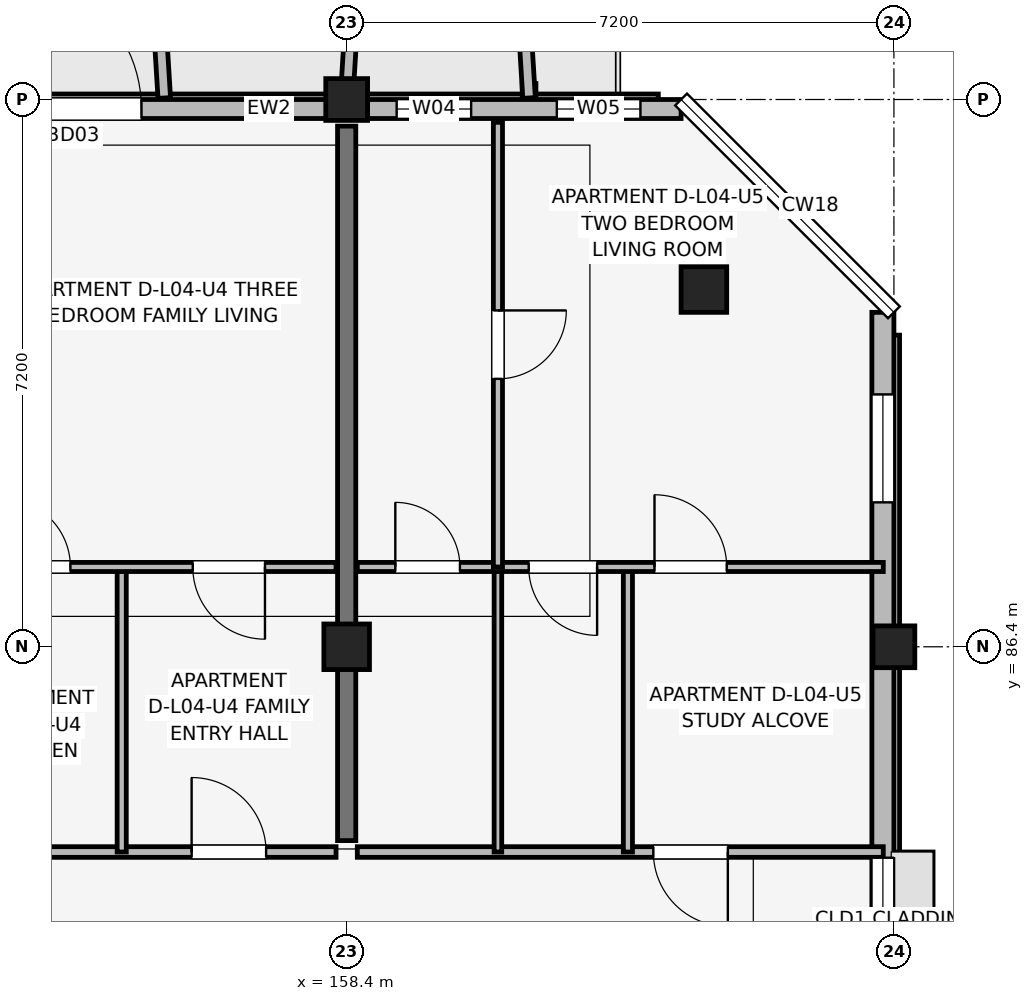
"""IFC4 building model, lengths in metres.
Left out: names, types, materials, properties, quantities, classifications, styles, units other than length and angle.
Written with IfcOpenShell. Run it as: python <this file> out.ifc"""

import sys

from ifc_helpers import new_model, si_unit, direction, frame, frame_2d, origin, origin_2d, place, context, subcontext, project, spatial, rectangle, extrude, element, fill, save


model = new_model("IFC4")
c1 = context("Model", 3, precision=1e-05, world=origin(), true_north=direction((0.0, 1.0)))
c2 = subcontext(c1, "Body", "Model", "MODEL_VIEW")
j1 = project(units=[si_unit("LENGTHUNIT", "METRE"), si_unit("PLANEANGLEUNIT", "RADIAN")], contexts=[c1])
p1 = place(None, origin())
s1 = spatial("IfcSite", under=j1, at=p1, CompositionType="ELEMENT")
p2 = place(p1, origin())
s2 = spatial("IfcBuilding", under=s1, at=p2, CompositionType="ELEMENT")
p3 = place(p2, frame((0.0, 0.0, 15.0)))
s3 = spatial("IfcBuildingStorey", under=s2, at=p3, CompositionType="ELEMENT", Elevation=15.0)
p4 = place(p3, frame((158.4, 86.4, 0.0), z_axis=(0.0, 0.0, 1.0), x_axis=(1.0, 0.0, 0.0)))
e1 = element("IfcColumn", 1, at=p4, inside=s3, PredefinedType="COLUMN", context=c2, shape_type="SweptSolid", body=[
    extrude(rectangle(XDim=0.6, YDim=0.6, at=origin_2d()), origin(), (0.0, 0.0, 1.0), 3.15),
])
for number, where, z_axis, x_axis in (
    (2, (158.4, 93.6, 0.0), (0.0, 0.0, 1.0), (1.0, 0.0, 0.0)),
    (3, (165.6, 86.4, 0.0), (0.0, 0.0, 1.0), (1.0, 0.0, 0.0)),
):
    element("IfcColumn", number, at=place(p3, frame(where, z_axis=z_axis, x_axis=x_axis)), inside=s3, PredefinedType="COLUMN", context=c2, shape_type="SweptSolid", body=[
        extrude(rectangle(XDim=0.55, YDim=0.55, at=origin_2d()), origin(), (0.0, 0.0, 1.0), 3.15),
    ])
p5 = place(p3, frame((163.1, 91.1, 0.0), z_axis=(0.0, 0.0, 1.0), x_axis=(1.0, 0.0, 0.0)))
e4 = element("IfcColumn", 4, at=p5, inside=s3, PredefinedType="COLUMN", context=c2, shape_type="SweptSolid", body=[
    extrude(rectangle(XDim=0.6, YDim=0.6, at=origin_2d()), origin(), (0.0, 0.0, 1.0), 3.15),
])
p6 = place(p3, frame((158.4, 83.85, 0.0), z_axis=(0.0, 0.0, 1.0), x_axis=(0.0, 1.0, 0.0)))
e5 = element("IfcWall", 5, at=p6, inside=s3, PredefinedType="SHEAR", context=c2, shape_type="SweptSolid", body=[
    extrude(rectangle(XDim=9.4, YDim=0.24, at=frame_2d((4.7, 0.0))), origin(), (0.0, 0.0, 1.0), 3.15),
])
p7 = place(p3, frame((165.455, 74.8, 0.0), z_axis=(0.0, 0.0, 1.0), x_axis=(0.0, 1.0, 0.0)))
e6 = element("IfcWall", 6, at=p7, inside=s3, PredefinedType="SOLIDWALL", context=c2, shape_type="SweptSolid", body=[
    extrude(rectangle(XDim=16.0, YDim=0.29, at=frame_2d((8.0, 0.0))), origin(), (0.0, 0.0, 1.0), 2.38),
])
p8 = place(p7, frame((7.175, 0.0, 1.05)))
e7 = element("IfcOpeningElement", 7, at=p8, cuts=e6, PredefinedType="OPENING", context=c2, shape_type="SweptSolid", body=[
    extrude(rectangle(XDim=1.65, YDim=1.15, at=frame_2d((0.825, 0.575))), frame((0.0, 0.155, 0.0), z_axis=(0.0, -1.0, 0.0), x_axis=(1.0, 0.0, 0.0)), (0.0, 0.0, 1.0), 0.31),
])
p9 = place(p7, frame((13.5, 0.0, 0.67)))
e8 = element("IfcOpeningElement", 8, at=p9, cuts=e6, PredefinedType="OPENING", context=c2, shape_type="SweptSolid", body=[
    extrude(rectangle(XDim=1.42, YDim=1.6, at=frame_2d((0.71, 0.8))), frame((0.0, 0.155, 0.0), z_axis=(0.0, -1.0, 0.0), x_axis=(1.0, 0.0, 0.0)), (0.0, 0.0, 1.0), 0.31),
])
p10 = place(p3, frame((162.8, 93.475, 0.0), z_axis=(0.0, 0.0, 1.0), x_axis=(-1.0, 0.0, 0.0)))
e9 = element("IfcWall", 9, at=p10, inside=s3, PredefinedType="SOLIDWALL", context=c2, shape_type="SweptSolid", body=[
    extrude(rectangle(XDim=30.4, YDim=0.25, at=frame_2d((15.2, 0.0))), origin(), (0.0, 0.0, 1.0), 2.43),
])
p11 = place(p10, frame((23.15, 0.0, 0.0), z_axis=(0.0, 0.0, 1.0), x_axis=(-1.0, 0.0, 0.0)))
e10 = element("IfcOpeningElement", 10, at=p11, cuts=e9, PredefinedType="OPENING", context=c2, shape_type="SweptSolid", body=[
    extrude(rectangle(XDim=1.5, YDim=2.15, at=frame_2d((0.75, 1.075))), frame((0.0, 0.135, 0.0), z_axis=(0.0, -1.0, 0.0), x_axis=(1.0, 0.0, 0.0)), (0.0, 0.0, 1.0), 0.27),
])
p12 = place(p10, frame((8.9, 0.0, 0.0), z_axis=(0.0, 0.0, 1.0), x_axis=(-1.0, 0.0, 0.0)))
e11 = element("IfcOpeningElement", 11, at=p12, cuts=e9, PredefinedType="OPENING", context=c2, shape_type="SweptSolid", body=[
    extrude(rectangle(XDim=1.8, YDim=2.15, at=frame_2d((0.9, 1.075))), frame((0.0, 0.135, 0.0), z_axis=(0.0, -1.0, 0.0), x_axis=(1.0, 0.0, 0.0)), (0.0, 0.0, 1.0), 0.27),
])
p13 = place(p10, frame((26.498, 0.0, 0.7)))
e12 = element("IfcOpeningElement", 12, at=p13, cuts=e9, PredefinedType="OPENING", context=c2, shape_type="SweptSolid", body=[
    extrude(rectangle(XDim=1.72, YDim=1.6, at=frame_2d((0.86, 0.8))), frame((0.0, 0.135, 0.0), z_axis=(0.0, -1.0, 0.0), x_axis=(1.0, 0.0, 0.0)), (0.0, 0.0, 1.0), 0.27),
])
p14 = place(p10, frame((24.183, 0.0, 0.75)))
e13 = element("IfcOpeningElement", 13, at=p14, cuts=e9, PredefinedType="OPENING", context=c2, shape_type="SweptSolid", body=[
    extrude(rectangle(XDim=1.34, YDim=1.55, at=frame_2d((0.67, 0.775))), frame((0.0, 0.135, 0.0), z_axis=(0.0, -1.0, 0.0), x_axis=(1.0, 0.0, 0.0)), (0.0, 0.0, 1.0), 0.27),
])
p15 = place(p10, frame((16.583, 0.0, 0.7)))
e14 = element("IfcOpeningElement", 14, at=p15, cuts=e9, PredefinedType="OPENING", context=c2, shape_type="SweptSolid", body=[
    extrude(rectangle(XDim=1.72, YDim=1.6, at=frame_2d((0.86, 0.8))), frame((0.0, 0.135, 0.0), z_axis=(0.0, -1.0, 0.0), x_axis=(1.0, 0.0, 0.0)), (0.0, 0.0, 1.0), 0.27),
])
p16 = place(p10, frame((12.597, 0.0, 0.75)))
e15 = element("IfcOpeningElement", 15, at=p16, cuts=e9, PredefinedType="OPENING", context=c2, shape_type="SweptSolid", body=[
    extrude(rectangle(XDim=0.72, YDim=1.35, at=frame_2d((0.36, 0.675))), frame((0.0, 0.135, 0.0), z_axis=(0.0, -1.0, 0.0), x_axis=(1.0, 0.0, 0.0)), (0.0, 0.0, 1.0), 0.27),
])
p17 = place(p10, frame((10.028, 0.0, 0.75)))
e16 = element("IfcOpeningElement", 16, at=p17, cuts=e9, PredefinedType="OPENING", context=c2, shape_type="SweptSolid", body=[
    extrude(rectangle(XDim=0.85, YDim=1.4, at=frame_2d((0.425, 0.7))), frame((0.0, 0.135, 0.0), z_axis=(0.0, -1.0, 0.0), x_axis=(1.0, 0.0, 0.0)), (0.0, 0.0, 1.0), 0.27),
])
p18 = place(p10, frame((2.762, 0.0, 0.75)))
e17 = element("IfcOpeningElement", 17, at=p18, cuts=e9, PredefinedType="OPENING", context=c2, shape_type="SweptSolid", body=[
    extrude(rectangle(XDim=0.98, YDim=1.45, at=frame_2d((0.49, 0.725))), frame((0.0, 0.135, 0.0), z_axis=(0.0, -1.0, 0.0), x_axis=(1.0, 0.0, 0.0)), (0.0, 0.0, 1.0), 0.27),
])
p19 = place(p10, frame((0.535, 0.0, 0.75)))
e18 = element("IfcOpeningElement", 18, at=p19, cuts=e9, PredefinedType="OPENING", context=c2, shape_type="SweptSolid", body=[
    extrude(rectangle(XDim=1.1, YDim=1.5, at=frame_2d((0.55, 0.75))), frame((0.0, 0.135, 0.0), z_axis=(0.0, -1.0, 0.0), x_axis=(1.0, 0.0, 0.0)), (0.0, 0.0, 1.0), 0.27),
])
p20 = place(p3, frame((156.0, 93.62, 0.0), z_axis=(0.0, 0.0, 1.0), x_axis=(-0.061170732449, 0.998127317276, 0.0)))
e19 = element("IfcWall", 19, at=p20, inside=s3, PredefinedType="ELEMENTEDWALL", context=c2, shape_type="SweptSolid", body=[
    extrude(rectangle(XDim=1.964, YDim=0.165, at=frame_2d((0.982, 0.0))), origin(), (0.0, 0.0, 1.0), 2.45),
])
for number, where, z_axis, x_axis in (
    (20, (158.4, 93.62, 0.0), (0.0, 0.0, 1.0), (0.061, 0.998, 0.0)),
    (21, (160.8, 93.62, 0.0), (0.0, 0.0, 1.0), (-0.061, 0.998, 0.0)),
):
    element("IfcWall", number, at=place(p3, frame(where, z_axis=z_axis, x_axis=x_axis)), inside=s3, PredefinedType="ELEMENTEDWALL", context=c2, shape_type="SweptSolid", body=[
        extrude(rectangle(XDim=1.964, YDim=0.165, at=frame_2d((0.982, 0.0))), origin(), (0.0, 0.0, 1.0), 2.95),
    ])
p21 = place(p3, frame((151.34, 83.7, 0.0), z_axis=(0.0, 0.0, 1.0), x_axis=(1.0, 0.0, 0.0)))
e22 = element("IfcWall", 22, at=p21, inside=s3, PredefinedType="PARTITIONING", context=c2, shape_type="SweptSolid", body=[
    extrude(rectangle(XDim=6.92, YDim=0.14, at=frame_2d((3.46, 0.0))), origin(), (0.0, 0.0, 1.0), 2.38),
])
p22 = place(p21, frame((5.02, 0.0, 0.0)))
e23 = element("IfcOpeningElement", 23, at=p22, cuts=e22, PredefinedType="OPENING", context=c2, shape_type="SweptSolid", body=[
    extrude(rectangle(XDim=0.98, YDim=2.1, at=frame_2d((0.49, 1.05))), frame((0.0, 0.08, 0.0), z_axis=(0.0, -1.0, 0.0), x_axis=(1.0, 0.0, 0.0)), (0.0, 0.0, 1.0), 0.16),
])
p23 = place(p3, frame((155.44, 83.7, 0.0), z_axis=(0.0, 0.0, 1.0), x_axis=(0.0, 1.0, 0.0)))
e24 = element("IfcWall", 24, at=p23, inside=s3, PredefinedType="PARTITIONING", context=c2, shape_type="SweptSolid", body=[
    extrude(rectangle(XDim=3.75, YDim=0.12, at=frame_2d((1.875, 0.0))), origin(), (0.0, 0.0, 1.0), 2.375),
])
p24 = place(p3, frame((151.34, 87.45, 0.0), z_axis=(0.0, 0.0, 1.0), x_axis=(1.0, 0.0, 0.0)))
e25 = element("IfcWall", 25, at=p24, inside=s3, PredefinedType="PARTITIONING", context=c2, shape_type="SweptSolid", body=[
    extrude(rectangle(XDim=6.92, YDim=0.12, at=frame_2d((3.46, 0.0))), origin(), (0.0, 0.0, 1.0), 2.38),
])
p25 = place(p24, frame((1.35, 0.0, 0.0), z_axis=(0.0, 0.0, 1.0), x_axis=(-1.0, 0.0, 0.0)))
e26 = element("IfcOpeningElement", 26, at=p25, cuts=e25, PredefinedType="OPENING", context=c2, shape_type="SweptSolid", body=[
    extrude(rectangle(XDim=0.85, YDim=2.08, at=frame_2d((0.425, 1.04))), frame((0.0, 0.07, 0.0), z_axis=(0.0, -1.0, 0.0), x_axis=(1.0, 0.0, 0.0)), (0.0, 0.0, 1.0), 0.14),
])
p26 = place(p24, frame((2.525, 0.0, 0.0)))
e27 = element("IfcOpeningElement", 27, at=p26, cuts=e25, PredefinedType="OPENING", context=c2, shape_type="SweptSolid", body=[
    extrude(rectangle(XDim=0.9, YDim=2.08, at=frame_2d((0.45, 1.04))), frame((0.0, 0.07, 0.0), z_axis=(0.0, -1.0, 0.0), x_axis=(1.0, 0.0, 0.0)), (0.0, 0.0, 1.0), 0.14),
])
p27 = place(p24, frame((5.985, 0.0, 0.0), z_axis=(0.0, 0.0, 1.0), x_axis=(-1.0, 0.0, 0.0)))
e28 = element("IfcOpeningElement", 28, at=p27, cuts=e25, PredefinedType="OPENING", context=c2, shape_type="SweptSolid", body=[
    extrude(rectangle(XDim=0.95, YDim=2.08, at=frame_2d((0.475, 1.04))), frame((0.0, 0.07, 0.0), z_axis=(0.0, -1.0, 0.0), x_axis=(1.0, 0.0, 0.0)), (0.0, 0.0, 1.0), 0.14),
])
p28 = place(p3, frame((158.54, 83.7, 0.0), z_axis=(0.0, 0.0, 1.0), x_axis=(1.0, 0.0, 0.0)))
e29 = element("IfcWall", 29, at=p28, inside=s3, PredefinedType="PARTITIONING", context=c2, shape_type="SweptSolid", body=[
    extrude(rectangle(XDim=6.92, YDim=0.14, at=frame_2d((3.46, 0.0))), origin(), (0.0, 0.0, 1.0), 2.38),
])
p29 = place(p28, frame((4.875, 0.0, 0.0), z_axis=(0.0, 0.0, 1.0), x_axis=(-1.0, 0.0, 0.0)))
e30 = element("IfcOpeningElement", 30, at=p29, cuts=e29, PredefinedType="OPENING", context=c2, shape_type="SweptSolid", body=[
    extrude(rectangle(XDim=0.98, YDim=2.1, at=frame_2d((0.49, 1.05))), frame((0.0, 0.08, 0.0), z_axis=(0.0, -1.0, 0.0), x_axis=(1.0, 0.0, 0.0)), (0.0, 0.0, 1.0), 0.16),
])
p30 = place(p3, frame((160.39, 83.7, 0.0), z_axis=(0.0, 0.0, 1.0), x_axis=(0.0, 1.0, 0.0)))
e31 = element("IfcWall", 31, at=p30, inside=s3, PredefinedType="PARTITIONING", context=c2, shape_type="SweptSolid", body=[
    extrude(rectangle(XDim=3.75, YDim=0.1, at=frame_2d((1.875, 0.0))), origin(), (0.0, 0.0, 1.0), 2.375),
])
p31 = place(p3, frame((162.1, 83.7, 0.0), z_axis=(0.0, 0.0, 1.0), x_axis=(0.0, 1.0, 0.0)))
e32 = element("IfcWall", 32, at=p31, inside=s3, PredefinedType="PARTITIONING", context=c2, shape_type="SweptSolid", body=[
    extrude(rectangle(XDim=3.75, YDim=0.12, at=frame_2d((1.875, 0.0))), origin(), (0.0, 0.0, 1.0), 2.375),
])
p32 = place(p3, frame((158.54, 87.45, 0.0), z_axis=(0.0, 0.0, 1.0), x_axis=(1.0, 0.0, 0.0)))
e33 = element("IfcWall", 33, at=p32, inside=s3, PredefinedType="PARTITIONING", context=c2, shape_type="SweptSolid", body=[
    extrude(rectangle(XDim=6.92, YDim=0.12, at=frame_2d((3.46, 0.0))), origin(), (0.0, 0.0, 1.0), 2.38),
])
p33 = place(p32, frame((0.5, 0.0, 0.0)))
e34 = element("IfcOpeningElement", 34, at=p33, cuts=e33, PredefinedType="OPENING", context=c2, shape_type="SweptSolid", body=[
    extrude(rectangle(XDim=0.85, YDim=2.08, at=frame_2d((0.425, 1.04))), frame((0.0, 0.07, 0.0), z_axis=(0.0, -1.0, 0.0), x_axis=(1.0, 0.0, 0.0)), (0.0, 0.0, 1.0), 0.14),
])
p34 = place(p32, frame((3.155, 0.0, 0.0), z_axis=(0.0, 0.0, 1.0), x_axis=(-1.0, 0.0, 0.0)))
e35 = element("IfcOpeningElement", 35, at=p34, cuts=e33, PredefinedType="OPENING", context=c2, shape_type="SweptSolid", body=[
    extrude(rectangle(XDim=0.9, YDim=2.08, at=frame_2d((0.45, 1.04))), frame((0.0, 0.07, 0.0), z_axis=(0.0, -1.0, 0.0), x_axis=(1.0, 0.0, 0.0)), (0.0, 0.0, 1.0), 0.14),
])
p35 = place(p32, frame((3.91, 0.0, 0.0)))
e36 = element("IfcOpeningElement", 36, at=p35, cuts=e33, PredefinedType="OPENING", context=c2, shape_type="SweptSolid", body=[
    extrude(rectangle(XDim=0.95, YDim=2.08, at=frame_2d((0.475, 1.04))), frame((0.0, 0.07, 0.0), z_axis=(0.0, -1.0, 0.0), x_axis=(1.0, 0.0, 0.0)), (0.0, 0.0, 1.0), 0.14),
])
p36 = place(p3, frame((160.39, 87.45, 0.0), z_axis=(0.0, 0.0, 1.0), x_axis=(0.0, 1.0, 0.0)))
e37 = element("IfcWall", 37, at=p36, inside=s3, PredefinedType="PARTITIONING", context=c2, shape_type="SweptSolid", body=[
    extrude(rectangle(XDim=5.85, YDim=0.12, at=frame_2d((2.925, 0.0))), origin(), (0.0, 0.0, 1.0), 2.38),
])
p37 = place(p36, frame((3.375, 0.0, 0.0), z_axis=(0.0, 0.0, 1.0), x_axis=(-1.0, 0.0, 0.0)))
e38 = element("IfcOpeningElement", 38, at=p37, cuts=e37, PredefinedType="OPENING", context=c2, shape_type="SweptSolid", body=[
    extrude(rectangle(XDim=0.9, YDim=2.08, at=frame_2d((0.45, 1.04))), frame((0.0, 0.07, 0.0), z_axis=(0.0, -1.0, 0.0), x_axis=(1.0, 0.0, 0.0)), (0.0, 0.0, 1.0), 0.14),
])
p38 = place(p12, origin())
e39 = element("IfcDoor", 39, at=p38, inside=s3, OperationType="SINGLE_SWING_RIGHT", PredefinedType="DOOR", context=c2, shape_type="SweptSolid", body=[
    extrude(rectangle(XDim=1.8, YDim=2.15, at=frame_2d((0.9, 1.075))), frame((0.0, 0.025, 0.0), z_axis=(0.0, -1.0, 0.0), x_axis=(1.0, 0.0, 0.0)), (0.0, 0.0, 1.0), 0.05),
])
fill(e11, e39)
p39 = place(p18, origin())
e40 = element("IfcWindow", 40, at=p39, inside=s3, PartitioningType="SINGLE_PANEL", PredefinedType="WINDOW", context=c2, shape_type="SweptSolid", body=[
    extrude(rectangle(XDim=0.98, YDim=1.45, at=frame_2d((0.49, 0.725))), frame((0.0, 0.03, 0.0), z_axis=(0.0, -1.0, 0.0), x_axis=(1.0, 0.0, 0.0)), (0.0, 0.0, 1.0), 0.06),
])
fill(e17, e40)
p40 = place(p19, origin())
e41 = element("IfcWindow", 41, at=p40, inside=s3, PartitioningType="SINGLE_PANEL", PredefinedType="WINDOW", context=c2, shape_type="SweptSolid", body=[
    extrude(rectangle(XDim=1.1, YDim=1.5, at=frame_2d((0.55, 0.75))), frame((0.0, 0.03, 0.0), z_axis=(0.0, -1.0, 0.0), x_axis=(1.0, 0.0, 0.0)), (0.0, 0.0, 1.0), 0.06),
])
fill(e18, e41)
p41 = place(p8, origin())
e42 = element("IfcWindow", 42, at=p41, inside=s3, PartitioningType="SINGLE_PANEL", PredefinedType="WINDOW", context=c2, shape_type="SweptSolid", body=[
    extrude(rectangle(XDim=1.65, YDim=1.15, at=frame_2d((0.825, 0.575))), frame((0.0, 0.03, 0.0), z_axis=(0.0, -1.0, 0.0), x_axis=(1.0, 0.0, 0.0)), (0.0, 0.0, 1.0), 0.06),
])
fill(e7, e42)
p42 = place(p9, origin())
e43 = element("IfcWindow", 43, at=p42, inside=s3, PartitioningType="SINGLE_PANEL", PredefinedType="WINDOW", context=c2, shape_type="SweptSolid", body=[
    extrude(rectangle(XDim=1.42, YDim=1.6, at=frame_2d((0.71, 0.8))), frame((0.0, 0.03, 0.0), z_axis=(0.0, -1.0, 0.0), x_axis=(1.0, 0.0, 0.0)), (0.0, 0.0, 1.0), 0.06),
])
fill(e8, e43)
p43 = place(p22, origin())
e44 = element("IfcDoor", 44, at=p43, inside=s3, OperationType="SINGLE_SWING_LEFT", PredefinedType="DOOR", context=c2, shape_type="SweptSolid", body=[
    extrude(rectangle(XDim=0.98, YDim=2.1, at=frame_2d((0.49, 1.05))), frame((0.0, 0.025, 0.0), z_axis=(0.0, -1.0, 0.0), x_axis=(1.0, 0.0, 0.0)), (0.0, 0.0, 1.0), 0.05),
])
fill(e23, e44)
p44 = place(p26, origin())
e45 = element("IfcDoor", 45, at=p44, inside=s3, OperationType="SINGLE_SWING_LEFT", PredefinedType="DOOR", context=c2, shape_type="SweptSolid", body=[
    extrude(rectangle(XDim=0.9, YDim=2.08, at=frame_2d((0.45, 1.04))), frame((0.0, 0.025, 0.0), z_axis=(0.0, -1.0, 0.0), x_axis=(1.0, 0.0, 0.0)), (0.0, 0.0, 1.0), 0.05),
])
fill(e27, e45)
p45 = place(p27, origin())
e46 = element("IfcDoor", 46, at=p45, inside=s3, OperationType="SINGLE_SWING_RIGHT", PredefinedType="DOOR", context=c2, shape_type="SweptSolid", body=[
    extrude(rectangle(XDim=0.95, YDim=2.08, at=frame_2d((0.475, 1.04))), frame((0.0, 0.025, 0.0), z_axis=(0.0, -1.0, 0.0), x_axis=(1.0, 0.0, 0.0)), (0.0, 0.0, 1.0), 0.05),
])
fill(e28, e46)
p46 = place(p29, origin())
e47 = element("IfcDoor", 47, at=p46, inside=s3, OperationType="SINGLE_SWING_RIGHT", PredefinedType="DOOR", context=c2, shape_type="SweptSolid", body=[
    extrude(rectangle(XDim=0.98, YDim=2.1, at=frame_2d((0.49, 1.05))), frame((0.0, 0.025, 0.0), z_axis=(0.0, -1.0, 0.0), x_axis=(1.0, 0.0, 0.0)), (0.0, 0.0, 1.0), 0.05),
])
fill(e30, e47)
p47 = place(p33, origin())
e48 = element("IfcDoor", 48, at=p47, inside=s3, OperationType="SINGLE_SWING_LEFT", PredefinedType="DOOR", context=c2, shape_type="SweptSolid", body=[
    extrude(rectangle(XDim=0.85, YDim=2.08, at=frame_2d((0.425, 1.04))), frame((0.0, 0.025, 0.0), z_axis=(0.0, -1.0, 0.0), x_axis=(1.0, 0.0, 0.0)), (0.0, 0.0, 1.0), 0.05),
])
fill(e34, e48)
p48 = place(p34, origin())
e49 = element("IfcDoor", 49, at=p48, inside=s3, OperationType="SINGLE_SWING_RIGHT", PredefinedType="DOOR", context=c2, shape_type="SweptSolid", body=[
    extrude(rectangle(XDim=0.9, YDim=2.08, at=frame_2d((0.45, 1.04))), frame((0.0, 0.025, 0.0), z_axis=(0.0, -1.0, 0.0), x_axis=(1.0, 0.0, 0.0)), (0.0, 0.0, 1.0), 0.05),
])
fill(e35, e49)
p49 = place(p35, origin())
e50 = element("IfcDoor", 50, at=p49, inside=s3, OperationType="SINGLE_SWING_LEFT", PredefinedType="DOOR", context=c2, shape_type="SweptSolid", body=[
    extrude(rectangle(XDim=0.95, YDim=2.08, at=frame_2d((0.475, 1.04))), frame((0.0, 0.025, 0.0), z_axis=(0.0, -1.0, 0.0), x_axis=(1.0, 0.0, 0.0)), (0.0, 0.0, 1.0), 0.05),
])
fill(e36, e50)
p50 = place(p37, origin())
e51 = element("IfcDoor", 51, at=p50, inside=s3, OperationType="SINGLE_SWING_RIGHT", PredefinedType="DOOR", context=c2, shape_type="SweptSolid", body=[
    extrude(rectangle(XDim=0.9, YDim=2.08, at=frame_2d((0.45, 1.04))), frame((0.0, 0.025, 0.0), z_axis=(0.0, -1.0, 0.0), x_axis=(1.0, 0.0, 0.0)), (0.0, 0.0, 1.0), 0.05),
])
fill(e38, e51)
save(model, sys.argv[1])
